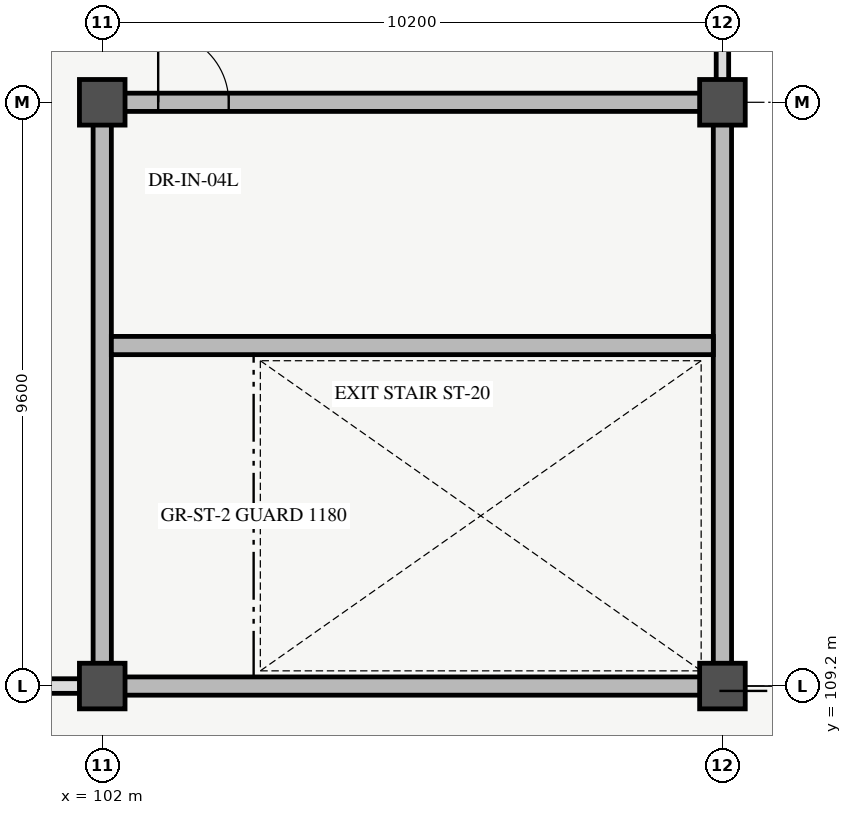
"""IFC4 building model, lengths in metres.
Left out: names, types, materials, properties, quantities, classifications, styles, units other than length and angle.
Written with IfcOpenShell. Run it as: python <this file> out.ifc"""

import sys

from ifc_helpers import new_model, si_unit, direction, frame, frame_2d, origin, origin_2d, place, context, subcontext, project, spatial, rectangle, extrude, element, fill, save


model = new_model("IFC4")
c1 = context("Model", 3, precision=1e-05, world=origin(), true_north=direction((0.0, 1.0)))
c2 = subcontext(c1, "Body", "Model", "MODEL_VIEW")
j1 = project(units=[si_unit("LENGTHUNIT", "METRE"), si_unit("PLANEANGLEUNIT", "RADIAN")], contexts=[c1])
p1 = place(None, origin())
s1 = spatial("IfcSite", under=j1, at=p1, CompositionType="ELEMENT")
p2 = place(p1, origin())
s2 = spatial("IfcBuilding", under=s1, at=p2, CompositionType="ELEMENT")
p3 = place(p2, frame((0.0, 0.0, 10.8)))
s3 = spatial("IfcBuildingStorey", under=s2, at=p3, CompositionType="ELEMENT", Elevation=10.8)
for number, where, z_axis, x_axis in (
    (1, (102.0, 109.2, 0.0), (0.0, 0.0, 1.0), (1.0, 0.0, 0.0)),
    (2, (102.0, 118.8, 0.0), (0.0, 0.0, 1.0), (1.0, 0.0, 0.0)),
    (3, (112.2, 109.2, 0.0), (0.0, 0.0, 1.0), (1.0, 0.0, 0.0)),
    (4, (112.2, 118.8, 0.0), (0.0, 0.0, 1.0), (1.0, 0.0, 0.0)),
):
    element("IfcColumn", number, at=place(p3, frame(where, z_axis=z_axis, x_axis=x_axis)), inside=s3, PredefinedType="COLUMN", context=c2, shape_type="SweptSolid", body=[
        extrude(rectangle(XDim=0.75, YDim=0.75, at=origin_2d()), origin(), (0.0, 0.0, 1.0), 4.2),
    ])
p4 = place(p3, frame((92.04, 109.2, 0.0), z_axis=(0.0, 0.0, 1.0), x_axis=(1.0, 0.0, 0.0)))
e5 = element("IfcWall", 5, at=p4, inside=s3, PredefinedType="STANDARD", context=c2, shape_type="SweptSolid", body=[
    extrude(rectangle(XDim=9.72, YDim=0.24, at=frame_2d((4.86, 0.0))), origin(), (0.0, 0.0, 1.0), 3.06),
])
p5 = place(p4, frame((3.06, 0.0, 0.9)))
e6 = element("IfcOpeningElement", 6, at=p5, cuts=e5, PredefinedType="OPENING", context=c2, shape_type="SweptSolid", body=[
    extrude(rectangle(XDim=3.6, YDim=2.1, at=frame_2d((1.8, 1.05))), frame((0.0, 0.13, 0.0), z_axis=(0.0, -1.0, 0.0), x_axis=(1.0, 0.0, 0.0)), (0.0, 0.0, 1.0), 0.26),
])
p6 = place(p3, frame((112.2, 119.04, 0.0), z_axis=(0.0, 0.0, 1.0), x_axis=(0.0, 1.0, 0.0)))
e7 = element("IfcWall", 7, at=p6, inside=s3, PredefinedType="STANDARD", context=c2, shape_type="SweptSolid", body=[
    extrude(rectangle(XDim=7.92, YDim=0.205, at=frame_2d((3.96, 0.0))), origin(), (0.0, 0.0, 1.0), 3.06),
])
p7 = place(p6, frame((3.06, 0.0, 0.95)))
e8 = element("IfcOpeningElement", 8, at=p7, cuts=e7, PredefinedType="OPENING", context=c2, shape_type="SweptSolid", body=[
    extrude(rectangle(XDim=1.8, YDim=1.8, at=frame_2d((0.9, 0.9))), frame((0.0, 0.113, 0.0), z_axis=(0.0, -1.0, 0.0), x_axis=(1.0, 0.0, 0.0)), (0.0, 0.0, 1.0), 0.225),
])
p8 = place(p3, frame((102.0, 109.2, 0.0), z_axis=(0.0, 0.0, 1.0), x_axis=(1.0, 0.0, 0.0)))
e9 = element("IfcWall", 9, at=p8, inside=s3, PredefinedType="SHEAR", context=c2, shape_type="SweptSolid", body=[
    extrude(rectangle(XDim=10.2, YDim=0.3, at=frame_2d((5.1, 0.0))), origin(), (0.0, 0.0, 1.0), 4.2),
])
p9 = place(p3, frame((102.0, 118.8, 0.0), z_axis=(0.0, 0.0, 1.0), x_axis=(1.0, 0.0, 0.0)))
e10 = element("IfcWall", 10, at=p9, inside=s3, PredefinedType="SHEAR", context=c2, shape_type="SweptSolid", body=[
    extrude(rectangle(XDim=10.2, YDim=0.3, at=frame_2d((5.1, 0.0))), origin(), (0.0, 0.0, 1.0), 4.2),
])
p10 = place(p9, frame((0.92, 0.0, 0.0)))
e11 = element("IfcOpeningElement", 11, at=p10, cuts=e10, PredefinedType="OPENING", context=c2, shape_type="SweptSolid", body=[
    extrude(rectangle(XDim=1.16, YDim=2.2, at=frame_2d((0.58, 1.1))), frame((0.0, 0.16, 0.0), z_axis=(0.0, -1.0, 0.0), x_axis=(1.0, 0.0, 0.0)), (0.0, 0.0, 1.0), 0.32),
])
for number, where, z_axis, x_axis in (
    (12, (102.0, 109.2, 0.0), (0.0, 0.0, 1.0), (0.0, 1.0, 0.0)),
    (13, (112.2, 109.2, 0.0), (0.0, 0.0, 1.0), (0.0, 1.0, 0.0)),
):
    element("IfcWall", number, at=place(p3, frame(where, z_axis=z_axis, x_axis=x_axis)), inside=s3, PredefinedType="SHEAR", context=c2, shape_type="SweptSolid", body=[
        extrude(rectangle(XDim=9.6, YDim=0.3, at=frame_2d((4.8, 0.0))), origin(), (0.0, 0.0, 1.0), 4.2),
    ])
p11 = place(p3, frame((102.15, 114.8, 0.0), z_axis=(0.0, 0.0, 1.0), x_axis=(1.0, 0.0, 0.0)))
e14 = element("IfcWall", 14, at=p11, inside=s3, PredefinedType="SHEAR", context=c2, shape_type="SweptSolid", body=[
    extrude(rectangle(XDim=9.9, YDim=0.3, at=frame_2d((4.95, 0.0))), origin(), (0.0, 0.0, 1.0), 4.2),
])
p12 = place(p10, origin())
e15 = element("IfcDoor", 15, at=p12, inside=s3, OperationType="SINGLE_SWING_LEFT", PredefinedType="DOOR", context=c2, shape_type="SweptSolid", body=[
    extrude(rectangle(XDim=1.16, YDim=2.2, at=frame_2d((0.58, 1.1))), frame((0.0, 0.025, 0.0), z_axis=(0.0, -1.0, 0.0), x_axis=(1.0, 0.0, 0.0)), (0.0, 0.0, 1.0), 0.05),
])
fill(e11, e15)
save(model, sys.argv[1])
